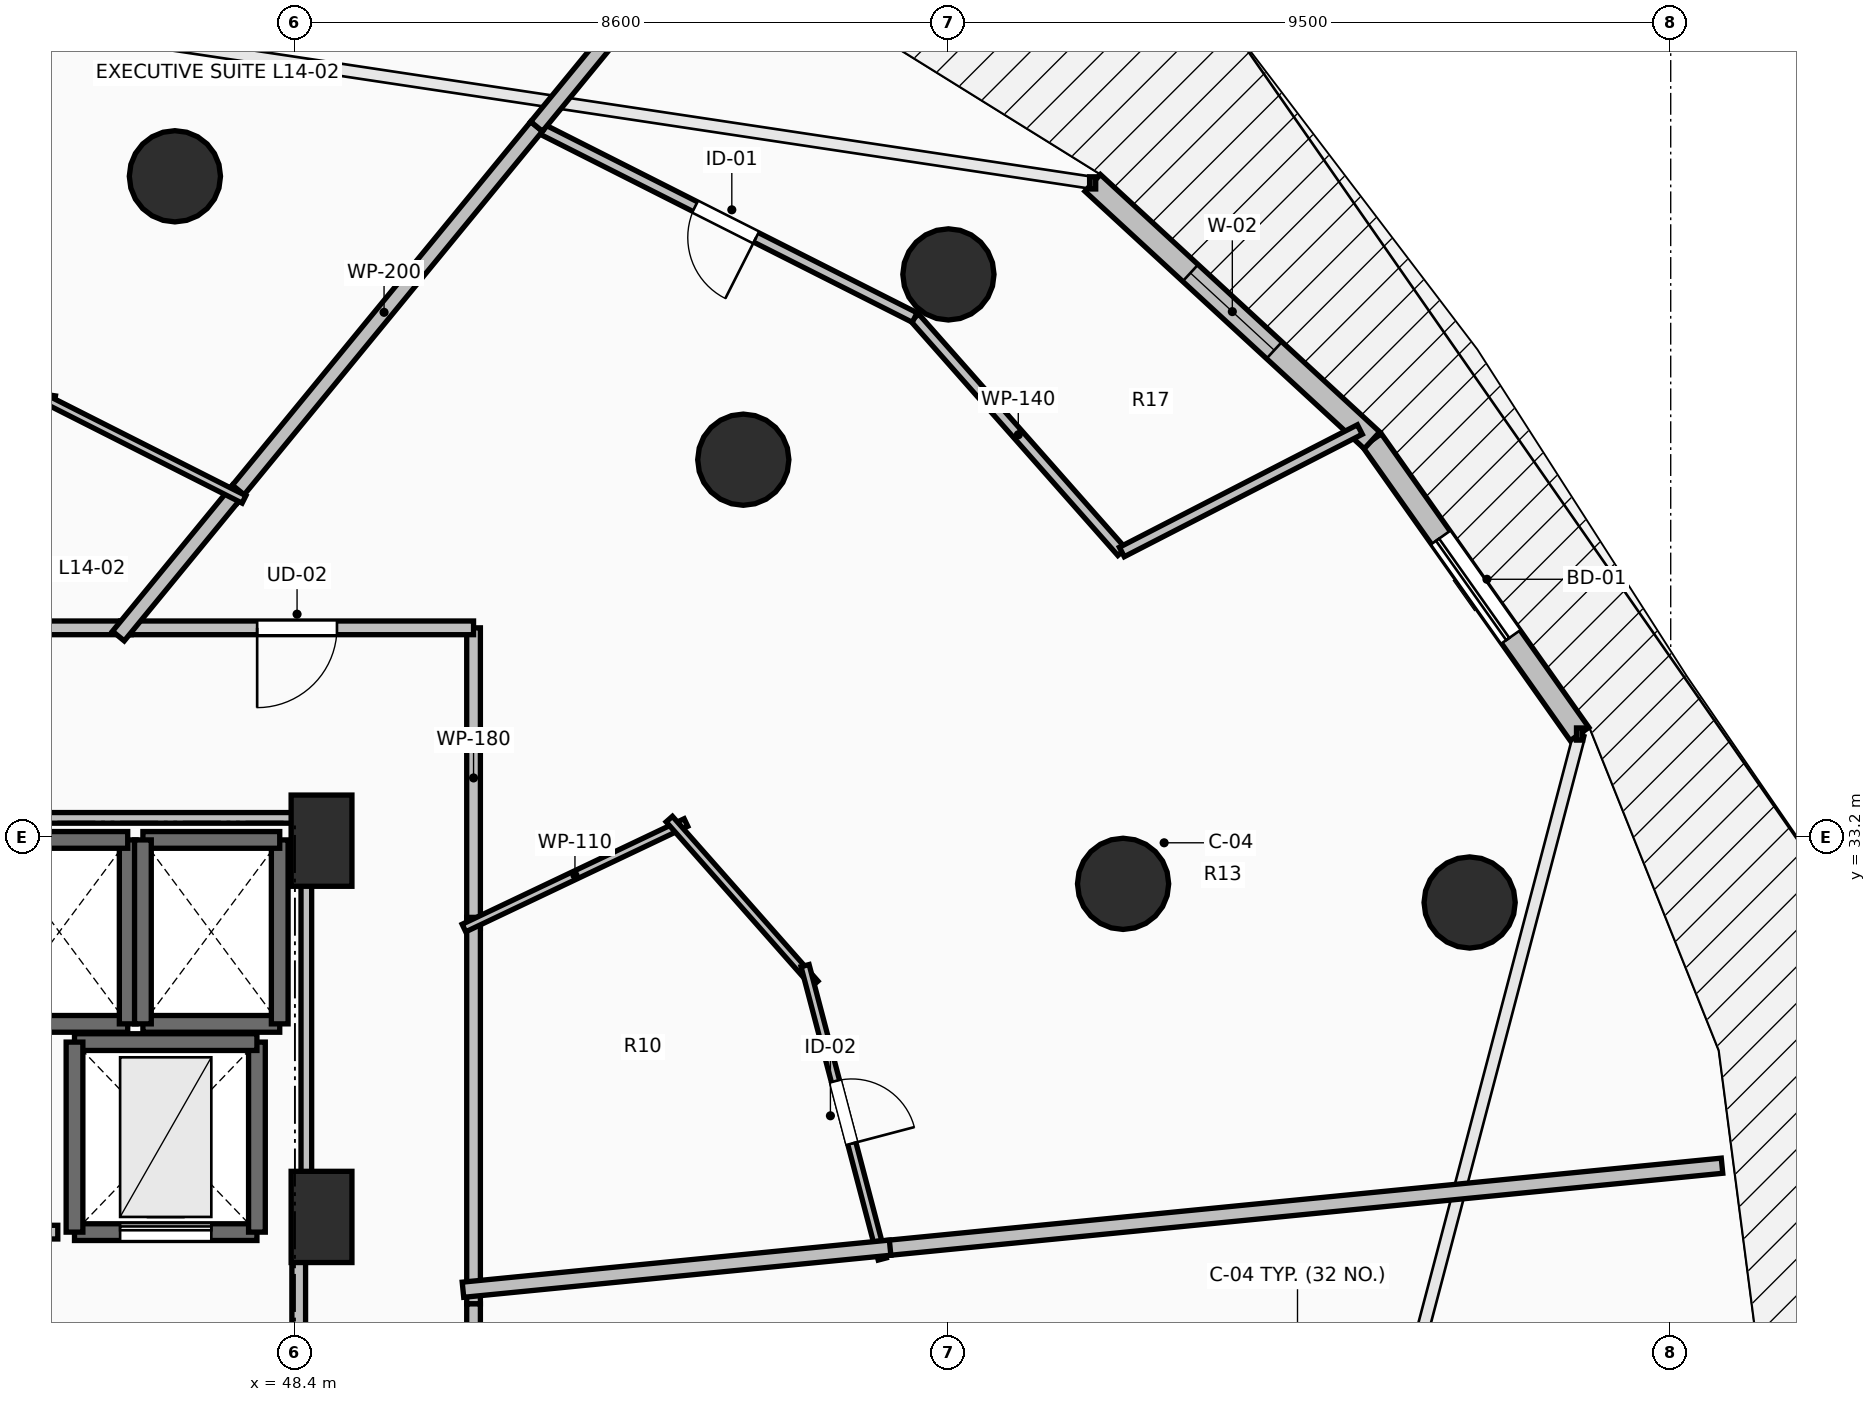
"""IFC4 building model, lengths in metres.
Left out: names, types, materials, properties, quantities, classifications, styles, units other than length and angle.
Written with IfcOpenShell. Run it as: python <this file> out.ifc"""

import sys

from ifc_helpers import new_model, si_unit, direction, frame, frame_2d, origin, origin_2d, place, context, subcontext, project, spatial, rectangle, circle, extrude, element, fill, save


model = new_model("IFC4")
c1 = context("Model", 3, precision=1e-05, world=origin(), true_north=direction((0.0, 1.0)))
c2 = subcontext(c1, "Body", "Model", "MODEL_VIEW")
j1 = project(units=[si_unit("LENGTHUNIT", "METRE"), si_unit("PLANEANGLEUNIT", "RADIAN")], contexts=[c1])
p1 = place(None, origin())
s1 = spatial("IfcSite", under=j1, at=p1, CompositionType="ELEMENT")
p2 = place(p1, origin())
s2 = spatial("IfcBuilding", under=s1, at=p2, CompositionType="ELEMENT")
p3 = place(p2, frame((0.0, 0.0, 55.5)))
s3 = spatial("IfcBuildingStorey", under=s2, at=p3, CompositionType="ELEMENT", Elevation=55.5)
for number, where, z_axis, x_axis in (
    (1, (59.295, 32.582, 0.0), (0.0, 0.0, 1.0), (0.924, 0.383, 0.0)),
    (2, (54.299, 38.162, 0.0), (0.0, 0.0, 1.0), (0.707, 0.707, 0.0)),
    (3, (46.821, 41.891, 0.0), (0.0, 0.0, 1.0), (0.383, 0.924, 0.0)),
    (4, (63.854, 32.337, 0.0), (0.0, 0.0, 1.0), (0.924, 0.383, 0.0)),
    (5, (56.997, 40.6, 0.0), (0.0, 0.0, 1.0), (0.707, 0.707, 0.0)),
):
    element("IfcColumn", number, at=place(p3, frame(where, z_axis=z_axis, x_axis=x_axis)), inside=s3, PredefinedType="COLUMN", context=c2, shape_type="SweptSolid", body=[
        extrude(circle(Radius=0.6, at=origin_2d()), origin(), (0.0, 0.0, 1.0), 3.5),
    ])
for number, where, z_axis, x_axis in (
    (6, (48.75, 33.15, 0.0), (0.0, 0.0, 1.0), (1.0, 0.0, 0.0)),
    (7, (48.75, 28.2, 0.0), (0.0, 0.0, 1.0), (1.0, 0.0, 0.0)),
):
    element("IfcColumn", number, at=place(p3, frame(where, z_axis=z_axis, x_axis=x_axis)), inside=s3, PredefinedType="PILASTER", context=c2, shape_type="SweptSolid", body=[
        extrude(rectangle(XDim=0.8, YDim=1.2, at=origin_2d()), origin(), (0.0, 0.0, 1.0), 3.5),
    ])
p4 = place(p3, frame((65.301, 34.553, 0.0), z_axis=(0.0, 0.0, 1.0), x_axis=(-0.577130815624, 0.816651713803, 0.0)))
e8 = element("IfcWall", 8, at=p4, inside=s3, PredefinedType="STANDARD", context=c2, shape_type="SweptSolid", body=[
    extrude(rectangle(XDim=4.731, YDim=0.3, at=frame_2d((2.366, 0.0))), origin(), (0.0, 0.0, 1.0), 3.24),
])
p5 = place(p4, frame((1.566, 0.0, 0.0)))
e9 = element("IfcOpeningElement", 9, at=p5, cuts=e8, PredefinedType="OPENING", context=c2, shape_type="SweptSolid", body=[
    extrude(rectangle(XDim=1.6, YDim=2.3, at=frame_2d((0.8, 1.15))), frame((0.0, 0.165, 0.0), z_axis=(0.0, -1.0, 0.0), x_axis=(1.0, 0.0, 0.0)), (0.0, 0.0, 1.0), 0.33),
])
p6 = place(p3, frame((62.57, 38.417, 0.0), z_axis=(0.0, 0.0, 1.0), x_axis=(-0.735342629635, 0.677695519419, 0.0)))
e10 = element("IfcWall", 10, at=p6, inside=s3, PredefinedType="STANDARD", context=c2, shape_type="SweptSolid", body=[
    extrude(rectangle(XDim=4.997, YDim=0.3, at=frame_2d((2.499, 0.0))), origin(), (0.0, 0.0, 1.0), 3.24),
])
p7 = place(p6, frame((1.749, 0.0, 0.85)))
e11 = element("IfcOpeningElement", 11, at=p7, cuts=e10, PredefinedType="OPENING", context=c2, shape_type="SweptSolid", body=[
    extrude(rectangle(XDim=1.5, YDim=2.19, at=frame_2d((0.75, 1.095))), frame((0.0, 0.165, 0.0), z_axis=(0.0, -1.0, 0.0), x_axis=(1.0, 0.0, 0.0)), (0.0, 0.0, 1.0), 0.33),
])
p8 = place(p3, frame((44.4, 30.74, 0.0), z_axis=(0.0, 0.0, 1.0), x_axis=(1.0, 0.0, 0.0)))
e12 = element("IfcWall", 12, at=p8, inside=s3, PredefinedType="SOLIDWALL", context=c2, shape_type="SweptSolid", body=[
    extrude(rectangle(XDim=1.8, YDim=0.22, at=frame_2d((0.9, 0.0))), origin(), (0.0, 0.0, 1.0), 3.24),
])
p9 = place(p3, frame((46.2, 30.74, 0.0), z_axis=(0.0, 0.0, 1.0), x_axis=(0.0, 1.0, 0.0)))
e13 = element("IfcWall", 13, at=p9, inside=s3, PredefinedType="SOLIDWALL", context=c2, shape_type="SweptSolid", body=[
    extrude(rectangle(XDim=2.42, YDim=0.22, at=frame_2d((1.21, 0.0))), origin(), (0.0, 0.0, 1.0), 3.24),
])
for number, where, z_axis, x_axis in (
    (14, (46.2, 33.16, 0.0), (0.0, 0.0, 1.0), (-1.0, 0.0, 0.0)),
    (15, (46.4, 30.74, 0.0), (0.0, 0.0, 1.0), (1.0, 0.0, 0.0)),
):
    element("IfcWall", number, at=place(p3, frame(where, z_axis=z_axis, x_axis=x_axis)), inside=s3, PredefinedType="SOLIDWALL", context=c2, shape_type="SweptSolid", body=[
        extrude(rectangle(XDim=1.8, YDim=0.22, at=frame_2d((0.9, 0.0))), origin(), (0.0, 0.0, 1.0), 3.24),
    ])
p10 = place(p3, frame((48.2, 30.74, 0.0), z_axis=(0.0, 0.0, 1.0), x_axis=(0.0, 1.0, 0.0)))
e16 = element("IfcWall", 16, at=p10, inside=s3, PredefinedType="SOLIDWALL", context=c2, shape_type="SweptSolid", body=[
    extrude(rectangle(XDim=2.42, YDim=0.22, at=frame_2d((1.21, 0.0))), origin(), (0.0, 0.0, 1.0), 3.24),
])
p11 = place(p3, frame((48.2, 33.16, 0.0), z_axis=(0.0, 0.0, 1.0), x_axis=(-1.0, 0.0, 0.0)))
e17 = element("IfcWall", 17, at=p11, inside=s3, PredefinedType="SOLIDWALL", context=c2, shape_type="SweptSolid", body=[
    extrude(rectangle(XDim=1.8, YDim=0.22, at=frame_2d((0.9, 0.0))), origin(), (0.0, 0.0, 1.0), 3.24),
])
p12 = place(p3, frame((46.4, 33.16, 0.0), z_axis=(0.0, 0.0, 1.0), x_axis=(0.0, -1.0, 0.0)))
e18 = element("IfcWall", 18, at=p12, inside=s3, PredefinedType="SOLIDWALL", context=c2, shape_type="SweptSolid", body=[
    extrude(rectangle(XDim=2.42, YDim=0.22, at=frame_2d((1.21, 0.0))), origin(), (0.0, 0.0, 1.0), 3.24),
])
p13 = place(p3, frame((45.5, 28.0, 0.0), z_axis=(0.0, 0.0, 1.0), x_axis=(1.0, 0.0, 0.0)))
e19 = element("IfcWall", 19, at=p13, inside=s3, PredefinedType="SHEAR", context=c2, shape_type="SweptSolid", body=[
    extrude(rectangle(XDim=2.4, YDim=0.22, at=frame_2d((1.2, 0.0))), origin(), (0.0, 0.0, 1.0), 3.24),
])
p14 = place(p13, frame((0.6, 0.0, 0.0)))
e20 = element("IfcOpeningElement", 20, at=p14, cuts=e19, PredefinedType="OPENING", context=c2, shape_type="SweptSolid", body=[
    extrude(rectangle(XDim=1.2, YDim=2.2, at=frame_2d((0.6, 1.1))), frame((0.0, 0.125, 0.0), z_axis=(0.0, -1.0, 0.0), x_axis=(1.0, 0.0, 0.0)), (0.0, 0.0, 1.0), 0.25),
])
p15 = place(p3, frame((47.9, 28.0, 0.0), z_axis=(0.0, 0.0, 1.0), x_axis=(0.0, 1.0, 0.0)))
e21 = element("IfcWall", 21, at=p15, inside=s3, PredefinedType="SHEAR", context=c2, shape_type="SweptSolid", body=[
    extrude(rectangle(XDim=2.5, YDim=0.22, at=frame_2d((1.25, 0.0))), origin(), (0.0, 0.0, 1.0), 3.24),
])
p16 = place(p3, frame((47.9, 30.5, 0.0), z_axis=(0.0, 0.0, 1.0), x_axis=(-1.0, 0.0, 0.0)))
e22 = element("IfcWall", 22, at=p16, inside=s3, PredefinedType="SHEAR", context=c2, shape_type="SweptSolid", body=[
    extrude(rectangle(XDim=2.4, YDim=0.22, at=frame_2d((1.2, 0.0))), origin(), (0.0, 0.0, 1.0), 3.24),
])
p17 = place(p3, frame((45.5, 30.5, 0.0), z_axis=(0.0, 0.0, 1.0), x_axis=(0.0, -1.0, 0.0)))
e23 = element("IfcWall", 23, at=p17, inside=s3, PredefinedType="SHEAR", context=c2, shape_type="SweptSolid", body=[
    extrude(rectangle(XDim=2.5, YDim=0.22, at=frame_2d((1.25, 0.0))), origin(), (0.0, 0.0, 1.0), 3.24),
])
p18 = place(p3, frame((48.45, 23.95, 0.0), z_axis=(0.0, 0.0, 1.0), x_axis=(0.0, 1.0, 0.0)))
e24 = element("IfcWall", 24, at=p18, inside=s3, PredefinedType="PARTITIONING", context=c2, shape_type="SweptSolid", body=[
    extrude(rectangle(XDim=4.05, YDim=0.18, at=frame_2d((2.025, 0.0))), origin(), (0.0, 0.0, 1.0), 3.24),
])
p19 = place(p18, frame((1.425, 0.0, 0.0)))
e25 = element("IfcOpeningElement", 25, at=p19, cuts=e24, PredefinedType="OPENING", context=c2, shape_type="SweptSolid", body=[
    extrude(rectangle(XDim=1.2, YDim=2.15, at=frame_2d((0.6, 1.075))), frame((0.0, 0.105, 0.0), z_axis=(0.0, -1.0, 0.0), x_axis=(1.0, 0.0, 0.0)), (0.0, 0.0, 1.0), 0.21),
])
p20 = place(p3, frame((50.75, 32.001, 0.0), z_axis=(0.0, 0.0, 1.0), x_axis=(0.0, 1.0, 0.0)))
e26 = element("IfcWall", 26, at=p20, inside=s3, PredefinedType="PARTITIONING", context=c2, shape_type="SweptSolid", body=[
    extrude(rectangle(XDim=3.949, YDim=0.18, at=frame_2d((1.975, 0.0))), origin(), (0.0, 0.0, 1.0), 2.432),
])
p21 = place(p3, frame((50.75, 35.95, 0.0), z_axis=(0.0, 0.0, 1.0), x_axis=(-1.0, 0.0, 0.0)))
e27 = element("IfcWall", 27, at=p21, inside=s3, PredefinedType="PARTITIONING", context=c2, shape_type="SweptSolid", body=[
    extrude(rectangle(XDim=4.644, YDim=0.18, at=frame_2d((2.322, 0.0))), origin(), (0.0, 0.0, 1.0), 2.432),
])
p22 = place(p21, frame((1.797, 0.0, 0.0)))
e28 = element("IfcOpeningElement", 28, at=p22, cuts=e27, PredefinedType="OPENING", context=c2, shape_type="SweptSolid", body=[
    extrude(rectangle(XDim=1.05, YDim=2.2, at=frame_2d((0.525, 1.1))), frame((0.0, 0.105, 0.0), z_axis=(0.0, -1.0, 0.0), x_axis=(1.0, 0.0, 0.0)), (0.0, 0.0, 1.0), 0.21),
])
p23 = place(p3, frame((50.75, 27.056, 0.0), z_axis=(0.0, 0.0, 1.0), x_axis=(0.0, 1.0, 0.0)))
e29 = element("IfcWall", 29, at=p23, inside=s3, PredefinedType="PARTITIONING", context=c2, shape_type="SweptSolid", body=[
    extrude(rectangle(XDim=5.085, YDim=0.18, at=frame_2d((2.542, 0.0))), origin(), (0.0, 0.0, 1.0), 2.432),
])
p24 = place(p3, frame((46.246, 35.95, 0.0), z_axis=(0.0, 0.0, 1.0), x_axis=(-1.0, 0.0, 0.0)))
e30 = element("IfcWall", 30, at=p24, inside=s3, PredefinedType="PARTITIONING", context=c2, shape_type="SweptSolid", body=[
    extrude(rectangle(XDim=4.784, YDim=0.18, at=frame_2d((2.392, 0.0))), origin(), (0.0, 0.0, 1.0), 3.24),
])
p25 = place(p3, frame((50.75, 15.596, 0.0), z_axis=(0.0, 0.0, 1.0), x_axis=(0.0, 1.0, 0.0)))
e31 = element("IfcWall", 31, at=p25, inside=s3, PredefinedType="PARTITIONING", context=c2, shape_type="SweptSolid", body=[
    extrude(rectangle(XDim=11.46, YDim=0.18, at=frame_2d((5.73, 0.0))), origin(), (0.0, 0.0, 1.0), 2.432),
])
p26 = place(p25, frame((5.23, 0.0, 0.0)))
e32 = element("IfcOpeningElement", 32, at=p26, cuts=e31, PredefinedType="OPENING", context=c2, shape_type="SweptSolid", body=[
    extrude(rectangle(XDim=1.0, YDim=2.15, at=frame_2d((0.5, 1.075))), frame((0.0, 0.105, 0.0), z_axis=(0.0, -1.0, 0.0), x_axis=(1.0, 0.0, 0.0)), (0.0, 0.0, 1.0), 0.21),
])
p27 = place(p3, frame((50.624, 32.001, 0.0), z_axis=(0.0, 0.0, 1.0), x_axis=(0.903186785932, 0.429247748647, 0.0)))
e33 = element("IfcWall", 33, at=p27, inside=s3, PredefinedType="PARTITIONING", context=c2, shape_type="SweptSolid", body=[
    extrude(rectangle(XDim=3.234, YDim=0.11, at=frame_2d((1.617, 0.0))), origin(), (0.0, 0.0, 1.0), 2.432),
])
p28 = place(p3, frame((53.325, 33.434, 0.0), z_axis=(0.0, 0.0, 1.0), x_axis=(0.661981720099, -0.749519981224, 0.0)))
e34 = element("IfcWall", 34, at=p28, inside=s3, PredefinedType="PARTITIONING", context=c2, shape_type="SweptSolid", body=[
    extrude(rectangle(XDim=2.892, YDim=0.11, at=frame_2d((1.446, 0.0))), origin(), (0.0, 0.0, 1.0), 2.432),
])
p29 = place(p3, frame((55.111, 31.506, 0.0), z_axis=(0.0, 0.0, 1.0), x_axis=(0.254405980461, -0.967097511684, 0.0)))
e35 = element("IfcWall", 35, at=p29, inside=s3, PredefinedType="PARTITIONING", context=c2, shape_type="SweptSolid", body=[
    extrude(rectangle(XDim=3.991, YDim=0.11, at=frame_2d((1.996, 0.0))), origin(), (0.0, 0.0, 1.0), 3.24),
])
p30 = place(p29, frame((1.571, 0.0, 0.0)))
e36 = element("IfcOpeningElement", 36, at=p30, cuts=e35, PredefinedType="OPENING", context=c2, shape_type="SweptSolid", body=[
    extrude(rectangle(XDim=0.85, YDim=2.1, at=frame_2d((0.425, 1.05))), frame((0.0, 0.07, 0.0), z_axis=(0.0, -1.0, 0.0), x_axis=(1.0, 0.0, 0.0)), (0.0, 0.0, 1.0), 0.14),
])
p31 = place(p3, frame((59.279, 36.948, 0.0), z_axis=(0.0, 0.0, 1.0), x_axis=(-0.662159063844, 0.749363312532, 0.0)))
e37 = element("IfcWall", 37, at=p31, inside=s3, PredefinedType="PARTITIONING", context=c2, shape_type="SweptSolid", body=[
    extrude(rectangle(XDim=4.115, YDim=0.14, at=frame_2d((2.058, 0.0))), origin(), (0.0, 0.0, 1.0), 2.432),
])
p32 = place(p3, frame((56.554, 40.032, 0.0), z_axis=(0.0, 0.0, 1.0), x_axis=(-0.892518178955, 0.451011419184, 0.0)))
e38 = element("IfcWall", 38, at=p32, inside=s3, PredefinedType="PARTITIONING", context=c2, shape_type="SweptSolid", body=[
    extrude(rectangle(XDim=5.574, YDim=0.14, at=frame_2d((2.787, 0.0))), origin(), (0.0, 0.0, 1.0), 2.432),
])
p33 = place(p32, frame((2.337, 0.0, 0.0)))
e39 = element("IfcOpeningElement", 39, at=p33, cuts=e38, PredefinedType="OPENING", context=c2, shape_type="SweptSolid", body=[
    extrude(rectangle(XDim=0.9, YDim=2.1, at=frame_2d((0.45, 1.05))), frame((0.0, 0.085, 0.0), z_axis=(0.0, -1.0, 0.0), x_axis=(1.0, 0.0, 0.0)), (0.0, 0.0, 1.0), 0.17),
])
p34 = place(p3, frame((62.41, 38.559, 0.0), z_axis=(0.0, 0.0, 1.0), x_axis=(-0.889180616302, -0.457556369852, 0.0)))
e40 = element("IfcWall", 40, at=p34, inside=s3, PredefinedType="PARTITIONING", context=c2, shape_type="SweptSolid", body=[
    extrude(rectangle(XDim=3.521, YDim=0.14, at=frame_2d((1.76, 0.0))), origin(), (0.0, 0.0, 1.0), 2.624),
])
p35 = place(p3, frame((51.579, 42.546, 0.0), z_axis=(0.0, 0.0, 1.0), x_axis=(-0.634407686013, -0.772998633846, 0.0)))
e41 = element("IfcWall", 41, at=p35, inside=s3, PredefinedType="PARTITIONING", context=c2, shape_type="SweptSolid", body=[
    extrude(rectangle(XDim=6.326, YDim=0.2, at=frame_2d((3.163, 0.0))), origin(), (0.0, 0.0, 1.0), 2.432),
])
p36 = place(p3, frame((47.655, 37.764, 0.0), z_axis=(0.0, 0.0, 1.0), x_axis=(-0.634343688691, -0.773051152653, 0.0)))
e42 = element("IfcWall", 42, at=p36, inside=s3, PredefinedType="PARTITIONING", context=c2, shape_type="SweptSolid", body=[
    extrude(rectangle(XDim=2.487, YDim=0.2, at=frame_2d((1.244, 0.0))), origin(), (0.0, 0.0, 1.0), 2.432),
])
p37 = place(p3, frame((56.091, 27.782, 0.0), z_axis=(0.0, 0.0, 1.0), x_axis=(0.995181539585, 0.098049493977, 0.0)))
e43 = element("IfcWall", 43, at=p37, inside=s3, PredefinedType="PARTITIONING", context=c2, shape_type="SweptSolid", body=[
    extrude(rectangle(XDim=11.138, YDim=0.2, at=frame_2d((5.569, 0.0))), origin(), (0.0, 0.0, 1.0), 2.624),
])
p38 = place(p3, frame((50.611, 27.242, 0.0), z_axis=(0.0, 0.0, 1.0), x_axis=(0.995185043486, 0.098013923607, 0.0)))
e44 = element("IfcWall", 44, at=p38, inside=s3, PredefinedType="PARTITIONING", context=c2, shape_type="SweptSolid", body=[
    extrude(rectangle(XDim=5.647, YDim=0.2, at=frame_2d((2.823, 0.0))), origin(), (0.0, 0.0, 1.0), 2.432),
])
p39 = place(p3, frame((53.54, 44.935, 0.0), z_axis=(0.0, 0.0, 1.0), x_axis=(-0.634432805544, -0.772978017313, 0.0)))
e45 = element("IfcWall", 45, at=p39, inside=s3, PredefinedType="PARTITIONING", context=c2, shape_type="SweptSolid", body=[
    extrude(rectangle(XDim=3.091, YDim=0.2, at=frame_2d((1.545, 0.0))), origin(), (0.0, 0.0, 1.0), 2.624),
])
p40 = place(p3, frame((42.6, 39.344, 0.0), z_axis=(0.0, 0.0, 1.0), x_axis=(0.988924954203, -0.148416424141, 0.0)))
e46 = element("IfcWall", 46, at=p40, inside=s3, PredefinedType="PARTITIONING", context=c2, shape_type="SweptSolid", body=[
    extrude(rectangle(XDim=2.671, YDim=0.11, at=frame_2d((1.336, 0.0))), origin(), (0.0, 0.0, 1.0), 3.24),
])
p41 = place(p3, frame((44.978, 39.031, 0.0), z_axis=(0.0, 0.0, 1.0), x_axis=(0.892423163915, -0.451199397725, 0.0)))
e47 = element("IfcWall", 47, at=p41, inside=s3, PredefinedType="PARTITIONING", context=c2, shape_type="SweptSolid", body=[
    extrude(rectangle(XDim=3.084, YDim=0.11, at=frame_2d((1.542, 0.0))), origin(), (0.0, 0.0, 1.0), 2.432),
])
p42 = place(p3, frame((45.28, 28.0, 0.0), z_axis=(0.0, 0.0, 1.0), x_axis=(-1.0, 0.0, 0.0)))
e48 = element("IfcWall", 48, at=p42, inside=s3, PredefinedType="PARTITIONING", context=c2, shape_type="SweptSolid", body=[
    extrude(rectangle(XDim=0.915, YDim=0.18, at=frame_2d((0.458, 0.0))), origin(), (0.0, 0.0, 1.0), 3.24),
])
p43 = place(p3, frame((44.34, 33.45, 0.0), z_axis=(0.0, 0.0, 1.0), x_axis=(1.0, 0.0, 0.0)))
e49 = element("IfcWall", 49, at=p43, inside=s3, PredefinedType="PARTITIONING", context=c2, shape_type="SweptSolid", body=[
    extrude(rectangle(XDim=4.21, YDim=0.14, at=frame_2d((2.105, 0.0))), origin(), (0.0, 0.0, 1.0), 2.432),
])
p44 = place(p3, frame((48.55, 33.45, 0.0), z_axis=(0.0, 0.0, 1.0), x_axis=(0.0, -1.0, 0.0)))
e50 = element("IfcWall", 50, at=p44, inside=s3, PredefinedType="PARTITIONING", context=c2, shape_type="SweptSolid", body=[
    extrude(rectangle(XDim=5.254, YDim=0.14, at=frame_2d((2.627, 0.0))), origin(), (0.0, 0.0, 1.0), 2.432),
])
p45 = place(p5, origin())
e51 = element("IfcDoor", 51, at=p45, inside=s3, OperationType="SLIDING_TO_LEFT", PredefinedType="DOOR", context=c2, shape_type="SweptSolid", body=[
    extrude(rectangle(XDim=1.6, YDim=2.3, at=frame_2d((0.8, 1.15))), frame((0.0, 0.025, 0.0), z_axis=(0.0, -1.0, 0.0), x_axis=(1.0, 0.0, 0.0)), (0.0, 0.0, 1.0), 0.05),
])
fill(e9, e51)
p46 = place(p7, origin())
e52 = element("IfcWindow", 52, at=p46, inside=s3, PartitioningType="SINGLE_PANEL", PredefinedType="WINDOW", context=c2, shape_type="SweptSolid", body=[
    extrude(rectangle(XDim=1.5, YDim=2.19, at=frame_2d((0.75, 1.095))), frame((0.0, 0.03, 0.0), z_axis=(0.0, -1.0, 0.0), x_axis=(1.0, 0.0, 0.0)), (0.0, 0.0, 1.0), 0.06),
])
fill(e11, e52)
p47 = place(p14, origin())
e53 = element("IfcDoor", 53, at=p47, inside=s3, OperationType="SLIDING_TO_LEFT", PredefinedType="DOOR", context=c2, shape_type="SweptSolid", body=[
    extrude(rectangle(XDim=1.2, YDim=2.2, at=frame_2d((0.6, 1.1))), frame((0.0, 0.025, 0.0), z_axis=(0.0, -1.0, 0.0), x_axis=(1.0, 0.0, 0.0)), (0.0, 0.0, 1.0), 0.05),
])
fill(e20, e53)
p48 = place(p22, origin())
e54 = element("IfcDoor", 54, at=p48, inside=s3, OperationType="SINGLE_SWING_RIGHT", PredefinedType="DOOR", context=c2, shape_type="SweptSolid", body=[
    extrude(rectangle(XDim=1.05, YDim=2.2, at=frame_2d((0.525, 1.1))), frame((0.0, 0.025, 0.0), z_axis=(0.0, -1.0, 0.0), x_axis=(1.0, 0.0, 0.0)), (0.0, 0.0, 1.0), 0.05),
])
fill(e28, e54)
p49 = place(p30, origin())
e55 = element("IfcDoor", 55, at=p49, inside=s3, OperationType="SINGLE_SWING_RIGHT", PredefinedType="DOOR", context=c2, shape_type="SweptSolid", body=[
    extrude(rectangle(XDim=0.85, YDim=2.1, at=frame_2d((0.425, 1.05))), frame((0.0, 0.025, 0.0), z_axis=(0.0, -1.0, 0.0), x_axis=(1.0, 0.0, 0.0)), (0.0, 0.0, 1.0), 0.05),
])
fill(e36, e55)
p50 = place(p33, origin())
e56 = element("IfcDoor", 56, at=p50, inside=s3, OperationType="SINGLE_SWING_LEFT", PredefinedType="DOOR", context=c2, shape_type="SweptSolid", body=[
    extrude(rectangle(XDim=0.9, YDim=2.1, at=frame_2d((0.45, 1.05))), frame((0.0, 0.025, 0.0), z_axis=(0.0, -1.0, 0.0), x_axis=(1.0, 0.0, 0.0)), (0.0, 0.0, 1.0), 0.05),
])
fill(e39, e56)
save(model, sys.argv[1])
